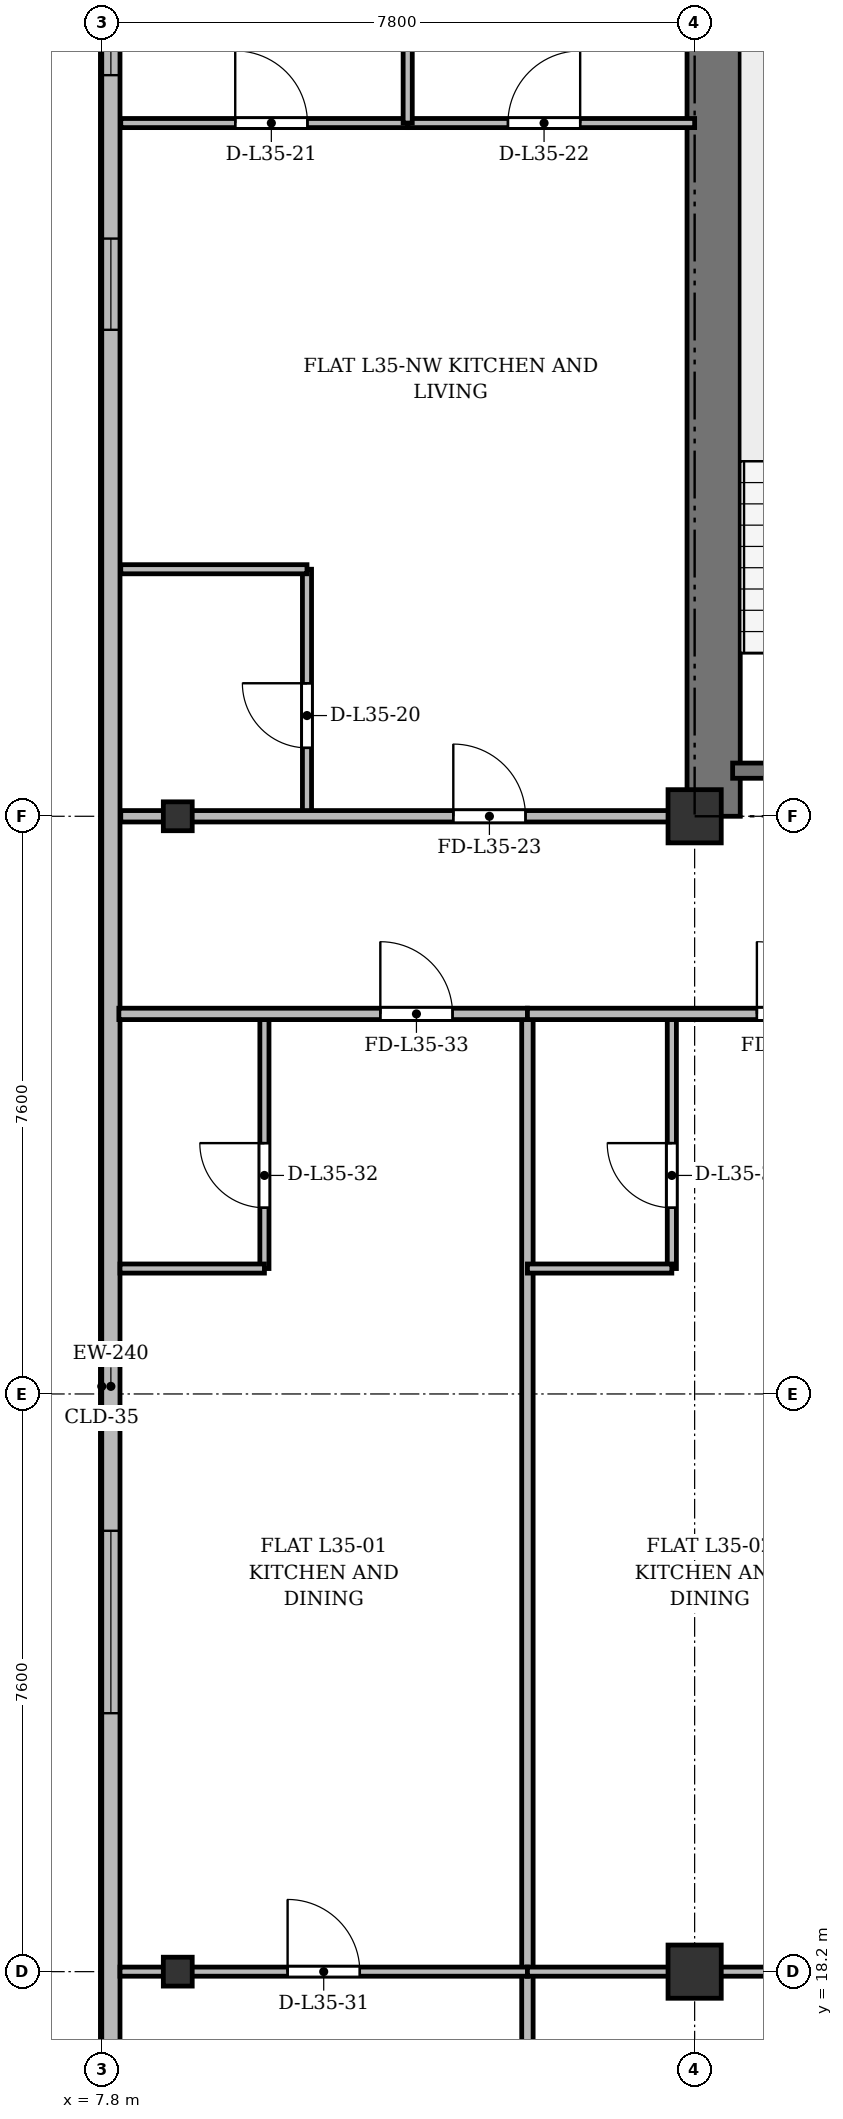
"""IFC4 building model, lengths in metres.
Left out: names, types, materials, properties, quantities, classifications, styles, units other than length and angle.
Written with IfcOpenShell. Run it as: python <this file> out.ifc"""

import sys

from ifc_helpers import new_model, si_unit, direction, frame, frame_2d, origin, origin_2d, place, context, subcontext, project, spatial, rectangle, i_section, extrude, source, transform, mapped, element, fill, save


model = new_model("IFC4")
c1 = context("Model", 3, precision=1e-05, world=origin(), true_north=direction((0.0, 1.0)))
c2 = subcontext(c1, "Body", "Model", "MODEL_VIEW")
j1 = project(units=[si_unit("LENGTHUNIT", "METRE"), si_unit("PLANEANGLEUNIT", "RADIAN")], contexts=[c1])
p1 = place(None, origin())
s1 = spatial("IfcSite", under=j1, at=p1, CompositionType="ELEMENT")
p2 = place(p1, origin())
s2 = spatial("IfcBuilding", under=s1, at=p2, CompositionType="ELEMENT")
p3 = place(p2, frame((0.0, 0.0, 135.7)))
s3 = spatial("IfcBuildingStorey", under=s2, at=p3, CompositionType="ELEMENT", Elevation=135.7)
m1 = source(origin(), c2, "Body", "SweptSolid", [
    extrude(i_section(OverallWidth=0.38, OverallDepth=0.38, WebThickness=0.02, FlangeThickness=0.03, at=origin_2d()), origin(), (0.0, 0.0, 1.0), 3.6),
])
for number, where, z_axis, x_axis in (
    (1, (8.8, 18.2, 0.0), (0.0, 0.0, 1.0), (1.0, 0.0, 0.0)),
    (2, (8.8, 33.4, 0.0), (0.0, 0.0, 1.0), (1.0, 0.0, 0.0)),
):
    element("IfcColumn", number, at=place(p3, frame(where, z_axis=z_axis, x_axis=x_axis)), inside=s3, PredefinedType="COLUMN", context=c2, shape_type="MappedRepresentation", body=[
        mapped(m1, transform((0.0, 0.0, 0.0), x_axis=(1.0, 0.0, 0.0), y_axis=(0.0, 1.0, 0.0), z_axis=(0.0, 0.0, 1.0), scale=1.0)),
    ])
m2 = source(origin(), c2, "Body", "SweptSolid", [
    extrude(rectangle(XDim=0.7, YDim=0.7, at=origin_2d()), origin(), (0.0, 0.0, 1.0), 3.6),
])
for number, where, z_axis, x_axis in (
    (3, (15.6, 18.2, 0.0), (0.0, 0.0, 1.0), (1.0, 0.0, 0.0)),
    (4, (15.6, 33.4, 0.0), (0.0, 0.0, 1.0), (1.0, 0.0, 0.0)),
):
    element("IfcColumn", number, at=place(p3, frame(where, z_axis=z_axis, x_axis=x_axis)), inside=s3, PredefinedType="COLUMN", context=c2, shape_type="MappedRepresentation", body=[
        mapped(m2, transform((0.0, 0.0, 0.0), x_axis=(1.0, 0.0, 0.0), y_axis=(0.0, 1.0, 0.0), z_axis=(0.0, 0.0, 1.0), scale=1.0)),
    ])
p4 = place(p3, frame((7.92, 6.3, 0.0), z_axis=(0.0, 0.0, 1.0), x_axis=(0.0, 1.0, 0.0)))
e5 = element("IfcWall", 5, at=p4, inside=s3, PredefinedType="SOLIDWALL", context=c2, shape_type="SweptSolid", body=[
    extrude(rectangle(XDim=39.2, YDim=0.24, at=frame_2d((19.6, 0.0))), origin(), (0.0, 0.0, 1.0), 3.35),
])
p5 = place(p4, frame((1.45, 0.0, 0.92)))
e6 = element("IfcOpeningElement", 6, at=p5, cuts=e5, PredefinedType="OPENING", context=c2, shape_type="SweptSolid", body=[
    extrude(rectangle(XDim=1.2, YDim=1.65, at=frame_2d((0.6, 0.825))), frame((0.0, 0.13, 0.0), z_axis=(0.0, -1.0, 0.0), x_axis=(1.0, 0.0, 0.0)), (0.0, 0.0, 1.0), 0.26),
])
p6 = place(p4, frame((3.9, 0.0, 0.92)))
e7 = element("IfcOpeningElement", 7, at=p6, cuts=e5, PredefinedType="OPENING", context=c2, shape_type="SweptSolid", body=[
    extrude(rectangle(XDim=2.4, YDim=2.1, at=frame_2d((1.2, 1.05))), frame((0.0, 0.13, 0.0), z_axis=(0.0, -1.0, 0.0), x_axis=(1.0, 0.0, 0.0)), (0.0, 0.0, 1.0), 0.26),
])
p7 = place(p4, frame((8.1, 0.0, 0.92)))
e8 = element("IfcOpeningElement", 8, at=p7, cuts=e5, PredefinedType="OPENING", context=c2, shape_type="SweptSolid", body=[
    extrude(rectangle(XDim=2.4, YDim=2.1, at=frame_2d((1.2, 1.05))), frame((0.0, 0.13, 0.0), z_axis=(0.0, -1.0, 0.0), x_axis=(1.0, 0.0, 0.0)), (0.0, 0.0, 1.0), 0.26),
])
p8 = place(p4, frame((15.3, 0.0, 0.92)))
e9 = element("IfcOpeningElement", 9, at=p8, cuts=e5, PredefinedType="OPENING", context=c2, shape_type="SweptSolid", body=[
    extrude(rectangle(XDim=2.4, YDim=2.1, at=frame_2d((1.2, 1.05))), frame((0.0, 0.13, 0.0), z_axis=(0.0, -1.0, 0.0), x_axis=(1.0, 0.0, 0.0)), (0.0, 0.0, 1.0), 0.26),
])
p9 = place(p4, frame((33.5, 0.0, 0.92)))
e10 = element("IfcOpeningElement", 10, at=p9, cuts=e5, PredefinedType="OPENING", context=c2, shape_type="SweptSolid", body=[
    extrude(rectangle(XDim=1.2, YDim=1.65, at=frame_2d((0.6, 0.825))), frame((0.0, 0.13, 0.0), z_axis=(0.0, -1.0, 0.0), x_axis=(1.0, 0.0, 0.0)), (0.0, 0.0, 1.0), 0.26),
])
p10 = place(p4, frame((36.85, 0.0, 0.92)))
e11 = element("IfcOpeningElement", 11, at=p10, cuts=e5, PredefinedType="OPENING", context=c2, shape_type="SweptSolid", body=[
    extrude(rectangle(XDim=1.2, YDim=1.65, at=frame_2d((0.6, 0.825))), frame((0.0, 0.13, 0.0), z_axis=(0.0, -1.0, 0.0), x_axis=(1.0, 0.0, 0.0)), (0.0, 0.0, 1.0), 0.26),
])
p11 = place(p3, frame((15.85, 33.4, 0.0), z_axis=(0.0, 0.0, 1.0), x_axis=(0.0, 1.0, 0.0)))
e12 = element("IfcWall", 12, at=p11, inside=s3, PredefinedType="SHEAR", context=c2, shape_type="SweptSolid", body=[
    extrude(rectangle(XDim=11.7, YDim=0.7, at=frame_2d((5.85, 0.0))), origin(), (0.0, 0.0, 1.0), 3.35),
])
p12 = place(p3, frame((16.1, 34.0, 0.0), z_axis=(0.0, 0.0, 1.0), x_axis=(1.0, 0.0, 0.0)))
e13 = element("IfcWall", 13, at=p12, inside=s3, PredefinedType="SHEAR", context=c2, shape_type="SweptSolid", body=[
    extrude(rectangle(XDim=3.4, YDim=0.2, at=frame_2d((1.7, 0.0))), origin(), (0.0, 0.0, 1.0), 3.35),
])
p13 = place(p3, frame((10.5, 33.4, 0.0), z_axis=(0.0, 0.0, 1.0), x_axis=(0.0, 1.0, 0.0)))
e14 = element("IfcWall", 14, at=p13, inside=s3, PredefinedType="PARTITIONING", context=c2, shape_type="SweptSolid", body=[
    extrude(rectangle(XDim=3.25, YDim=0.12, at=frame_2d((1.625, 0.0))), origin(), (0.0, 0.0, 1.0), 2.75),
])
p14 = place(p13, frame((0.9, 0.0, 0.0)))
e15 = element("IfcOpeningElement", 15, at=p14, cuts=e14, PredefinedType="OPENING", context=c2, shape_type="SweptSolid", body=[
    extrude(rectangle(XDim=0.85, YDim=2.1, at=frame_2d((0.425, 1.05))), frame((0.0, 0.07, 0.0), z_axis=(0.0, -1.0, 0.0), x_axis=(1.0, 0.0, 0.0)), (0.0, 0.0, 1.0), 0.14),
])
p15 = place(p3, frame((8.05, 36.65, 0.0), z_axis=(0.0, 0.0, 1.0), x_axis=(1.0, 0.0, 0.0)))
e16 = element("IfcWall", 16, at=p15, inside=s3, PredefinedType="PARTITIONING", context=c2, shape_type="SweptSolid", body=[
    extrude(rectangle(XDim=2.45, YDim=0.12, at=frame_2d((1.225, 0.0))), origin(), (0.0, 0.0, 1.0), 2.85),
])
p16 = place(p3, frame((8.05, 42.52, 0.0), z_axis=(0.0, 0.0, 1.0), x_axis=(1.0, 0.0, 0.0)))
e17 = element("IfcWall", 17, at=p16, inside=s3, PredefinedType="PARTITIONING", context=c2, shape_type="SweptSolid", body=[
    extrude(rectangle(XDim=3.775, YDim=0.12, at=frame_2d((1.887, 0.0))), origin(), (0.0, 0.0, 1.0), 2.85),
])
p17 = place(p16, frame((1.506, 0.0, 0.0)))
e18 = element("IfcOpeningElement", 18, at=p17, cuts=e17, PredefinedType="OPENING", context=c2, shape_type="SweptSolid", body=[
    extrude(rectangle(XDim=0.95, YDim=2.15, at=frame_2d((0.475, 1.075))), frame((0.0, 0.07, 0.0), z_axis=(0.0, -1.0, 0.0), x_axis=(1.0, 0.0, 0.0)), (0.0, 0.0, 1.0), 0.14),
])
p18 = place(p3, frame((11.825, 42.52, 0.0), z_axis=(0.0, 0.0, 1.0), x_axis=(1.0, 0.0, 0.0)))
e19 = element("IfcWall", 19, at=p18, inside=s3, PredefinedType="PARTITIONING", context=c2, shape_type="SweptSolid", body=[
    extrude(rectangle(XDim=3.775, YDim=0.12, at=frame_2d((1.888, 0.0))), origin(), (0.0, 0.0, 1.0), 2.85),
])
p19 = place(p18, frame((1.319, 0.0, 0.0)))
e20 = element("IfcOpeningElement", 20, at=p19, cuts=e19, PredefinedType="OPENING", context=c2, shape_type="SweptSolid", body=[
    extrude(rectangle(XDim=0.95, YDim=2.15, at=frame_2d((0.475, 1.075))), frame((0.0, 0.07, 0.0), z_axis=(0.0, -1.0, 0.0), x_axis=(1.0, 0.0, 0.0)), (0.0, 0.0, 1.0), 0.14),
])
p20 = place(p3, frame((11.825, 42.52, 0.0), z_axis=(0.0, 0.0, 1.0), x_axis=(0.0, 1.0, 0.0)))
e21 = element("IfcWall", 21, at=p20, inside=s3, PredefinedType="PARTITIONING", context=c2, shape_type="SweptSolid", body=[
    extrude(rectangle(XDim=5.74, YDim=0.12, at=frame_2d((2.87, 0.0))), origin(), (0.0, 0.0, 1.0), 2.75),
])
p21 = place(p3, frame((8.05, 33.4, 0.0), z_axis=(0.0, 0.0, 1.0), x_axis=(1.0, 0.0, 0.0)))
e22 = element("IfcWall", 22, at=p21, inside=s3, PredefinedType="PARTITIONING", context=c2, shape_type="SweptSolid", body=[
    extrude(rectangle(XDim=7.55, YDim=0.15, at=frame_2d((3.775, 0.0))), origin(), (0.0, 0.0, 1.0), 2.75),
])
p22 = place(p21, frame((4.375, 0.0, 0.0)))
e23 = element("IfcOpeningElement", 23, at=p22, cuts=e22, PredefinedType="OPENING", context=c2, shape_type="SweptSolid", body=[
    extrude(rectangle(XDim=0.95, YDim=2.15, at=frame_2d((0.475, 1.075))), frame((0.0, 0.085, 0.0), z_axis=(0.0, -1.0, 0.0), x_axis=(1.0, 0.0, 0.0)), (0.0, 0.0, 1.0), 0.17),
])
p23 = place(p3, frame((13.4, 3.525, 0.0), z_axis=(0.0, 0.0, 1.0), x_axis=(0.0, 1.0, 0.0)))
e24 = element("IfcWall", 24, at=p23, inside=s3, PredefinedType="PARTITIONING", context=c2, shape_type="SweptSolid", body=[
    extrude(rectangle(XDim=27.275, YDim=0.15, at=frame_2d((13.638, 0.0))), origin(), (0.0, 0.0, 1.0), 2.75),
])
p24 = place(p3, frame((8.04, 18.2, 0.0), z_axis=(0.0, 0.0, 1.0), x_axis=(1.0, 0.0, 0.0)))
e25 = element("IfcWall", 25, at=p24, inside=s3, PredefinedType="PARTITIONING", context=c2, shape_type="SweptSolid", body=[
    extrude(rectangle(XDim=5.36, YDim=0.12, at=frame_2d((2.68, 0.0))), origin(), (0.0, 0.0, 1.0), 2.75),
])
p25 = place(p24, frame((2.205, 0.0, 0.0)))
e26 = element("IfcOpeningElement", 26, at=p25, cuts=e25, PredefinedType="OPENING", context=c2, shape_type="SweptSolid", body=[
    extrude(rectangle(XDim=0.95, YDim=2.15, at=frame_2d((0.475, 1.075))), frame((0.0, 0.07, 0.0), z_axis=(0.0, -1.0, 0.0), x_axis=(1.0, 0.0, 0.0)), (0.0, 0.0, 1.0), 0.14),
])
p26 = place(p3, frame((9.94, 27.45, 0.0), z_axis=(0.0, 0.0, 1.0), x_axis=(0.0, 1.0, 0.0)))
e27 = element("IfcWall", 27, at=p26, inside=s3, PredefinedType="PARTITIONING", context=c2, shape_type="SweptSolid", body=[
    extrude(rectangle(XDim=3.35, YDim=0.12, at=frame_2d((1.675, 0.0))), origin(), (0.0, 0.0, 1.0), 3.35),
])
p27 = place(p26, frame((0.8, 0.0, 0.0)))
e28 = element("IfcOpeningElement", 28, at=p27, cuts=e27, PredefinedType="OPENING", context=c2, shape_type="SweptSolid", body=[
    extrude(rectangle(XDim=0.85, YDim=2.1, at=frame_2d((0.425, 1.05))), frame((0.0, 0.07, 0.0), z_axis=(0.0, -1.0, 0.0), x_axis=(1.0, 0.0, 0.0)), (0.0, 0.0, 1.0), 0.14),
])
p28 = place(p3, frame((8.04, 27.45, 0.0), z_axis=(0.0, 0.0, 1.0), x_axis=(1.0, 0.0, 0.0)))
e29 = element("IfcWall", 29, at=p28, inside=s3, PredefinedType="PARTITIONING", context=c2, shape_type="SweptSolid", body=[
    extrude(rectangle(XDim=1.9, YDim=0.12, at=frame_2d((0.95, 0.0))), origin(), (0.0, 0.0, 1.0), 2.85),
])
p29 = place(p3, frame((8.025, 30.8, 0.0), z_axis=(0.0, 0.0, 1.0), x_axis=(1.0, 0.0, 0.0)))
e30 = element("IfcWall", 30, at=p29, inside=s3, PredefinedType="PARTITIONING", context=c2, shape_type="SweptSolid", body=[
    extrude(rectangle(XDim=5.375, YDim=0.15, at=frame_2d((2.688, 0.0))), origin(), (0.0, 0.0, 1.0), 2.85),
])
p30 = place(p29, frame((3.44, 0.0, 0.0)))
e31 = element("IfcOpeningElement", 31, at=p30, cuts=e30, PredefinedType="OPENING", context=c2, shape_type="SweptSolid", body=[
    extrude(rectangle(XDim=0.95, YDim=2.15, at=frame_2d((0.475, 1.075))), frame((0.0, 0.085, 0.0), z_axis=(0.0, -1.0, 0.0), x_axis=(1.0, 0.0, 0.0)), (0.0, 0.0, 1.0), 0.17),
])
p31 = place(p3, frame((13.4, 18.2, 0.0), z_axis=(0.0, 0.0, 1.0), x_axis=(1.0, 0.0, 0.0)))
e32 = element("IfcWall", 32, at=p31, inside=s3, PredefinedType="PARTITIONING", context=c2, shape_type="SweptSolid", body=[
    extrude(rectangle(XDim=4.8, YDim=0.12, at=frame_2d((2.4, 0.0))), origin(), (0.0, 0.0, 1.0), 2.75),
])
p32 = place(p31, frame((3.288, 0.0, 0.0)))
e33 = element("IfcOpeningElement", 33, at=p32, cuts=e32, PredefinedType="OPENING", context=c2, shape_type="SweptSolid", body=[
    extrude(rectangle(XDim=0.95, YDim=2.15, at=frame_2d((0.475, 1.075))), frame((0.0, 0.07, 0.0), z_axis=(0.0, -1.0, 0.0), x_axis=(1.0, 0.0, 0.0)), (0.0, 0.0, 1.0), 0.14),
])
p33 = place(p3, frame((15.3, 27.45, 0.0), z_axis=(0.0, 0.0, 1.0), x_axis=(0.0, 1.0, 0.0)))
e34 = element("IfcWall", 34, at=p33, inside=s3, PredefinedType="PARTITIONING", context=c2, shape_type="SweptSolid", body=[
    extrude(rectangle(XDim=3.35, YDim=0.12, at=frame_2d((1.675, 0.0))), origin(), (0.0, 0.0, 1.0), 3.35),
])
p34 = place(p33, frame((0.8, 0.0, 0.0)))
e35 = element("IfcOpeningElement", 35, at=p34, cuts=e34, PredefinedType="OPENING", context=c2, shape_type="SweptSolid", body=[
    extrude(rectangle(XDim=0.85, YDim=2.1, at=frame_2d((0.425, 1.05))), frame((0.0, 0.07, 0.0), z_axis=(0.0, -1.0, 0.0), x_axis=(1.0, 0.0, 0.0)), (0.0, 0.0, 1.0), 0.14),
])
p35 = place(p3, frame((13.4, 27.45, 0.0), z_axis=(0.0, 0.0, 1.0), x_axis=(1.0, 0.0, 0.0)))
e36 = element("IfcWall", 36, at=p35, inside=s3, PredefinedType="PARTITIONING", context=c2, shape_type="SweptSolid", body=[
    extrude(rectangle(XDim=1.9, YDim=0.12, at=frame_2d((0.95, 0.0))), origin(), (0.0, 0.0, 1.0), 3.35),
])
p36 = place(p3, frame((13.4, 30.8, 0.0), z_axis=(0.0, 0.0, 1.0), x_axis=(1.0, 0.0, 0.0)))
e37 = element("IfcWall", 37, at=p36, inside=s3, PredefinedType="PARTITIONING", context=c2, shape_type="SweptSolid", body=[
    extrude(rectangle(XDim=4.8, YDim=0.15, at=frame_2d((2.4, 0.0))), origin(), (0.0, 0.0, 1.0), 2.85),
])
p37 = place(p36, frame((3.019, 0.0, 0.0)))
e38 = element("IfcOpeningElement", 38, at=p37, cuts=e37, PredefinedType="OPENING", context=c2, shape_type="SweptSolid", body=[
    extrude(rectangle(XDim=0.95, YDim=2.15, at=frame_2d((0.475, 1.075))), frame((0.0, 0.085, 0.0), z_axis=(0.0, -1.0, 0.0), x_axis=(1.0, 0.0, 0.0)), (0.0, 0.0, 1.0), 0.17),
])
m3 = source(origin(), c2, "Body", "SweptSolid", [
    extrude(rectangle(XDim=2.4, YDim=2.1, at=frame_2d((1.2, 1.05))), frame((0.0, 0.03, 0.0), z_axis=(0.0, -1.0, 0.0), x_axis=(1.0, 0.0, 0.0)), (0.0, 0.0, 1.0), 0.06),
])
p38 = place(p8, origin())
e39 = element("IfcWindow", 39, at=p38, inside=s3, PartitioningType="SINGLE_PANEL", PredefinedType="WINDOW", context=c2, shape_type="MappedRepresentation", body=[
    mapped(m3, transform((0.0, 0.0, 0.0), x_axis=(1.0, 0.0, 0.0), y_axis=(0.0, 1.0, 0.0), z_axis=(0.0, 0.0, 1.0), scale=1.0)),
])
fill(e9, e39)
m4 = source(origin(), c2, "Body", "SweptSolid", [
    extrude(rectangle(XDim=1.2, YDim=1.65, at=frame_2d((0.6, 0.825))), frame((0.0, 0.03, 0.0), z_axis=(0.0, -1.0, 0.0), x_axis=(1.0, 0.0, 0.0)), (0.0, 0.0, 1.0), 0.06),
])
p39 = place(p9, origin())
e40 = element("IfcWindow", 40, at=p39, inside=s3, PartitioningType="SINGLE_PANEL", PredefinedType="WINDOW", context=c2, shape_type="MappedRepresentation", body=[
    mapped(m4, transform((0.0, 0.0, 0.0), x_axis=(1.0, 0.0, 0.0), y_axis=(0.0, 1.0, 0.0), z_axis=(0.0, 0.0, 1.0), scale=1.0)),
])
fill(e10, e40)
p40 = place(p10, origin())
e41 = element("IfcWindow", 41, at=p40, inside=s3, PartitioningType="SINGLE_PANEL", PredefinedType="WINDOW", context=c2, shape_type="MappedRepresentation", body=[
    mapped(m4, transform((0.0, 0.0, 0.0), x_axis=(1.0, 0.0, 0.0), y_axis=(0.0, 1.0, 0.0), z_axis=(0.0, 0.0, 1.0), scale=1.0)),
])
fill(e11, e41)
m5 = source(origin(), c2, "Body", "SweptSolid", [
    extrude(rectangle(XDim=0.85, YDim=2.1, at=frame_2d((0.425, 1.05))), frame((0.0, 0.025, 0.0), z_axis=(0.0, -1.0, 0.0), x_axis=(1.0, 0.0, 0.0)), (0.0, 0.0, 1.0), 0.05),
])
p41 = place(p14, origin())
e42 = element("IfcDoor", 42, at=p41, inside=s3, OperationType="SINGLE_SWING_RIGHT", PredefinedType="DOOR", context=c2, shape_type="MappedRepresentation", body=[
    mapped(m5, transform((0.0, 0.0, 0.0), x_axis=(1.0, 0.0, 0.0), y_axis=(0.0, 1.0, 0.0), z_axis=(0.0, 0.0, 1.0), scale=1.0)),
])
fill(e15, e42)
m6 = source(origin(), c2, "Body", "SweptSolid", [
    extrude(rectangle(XDim=0.95, YDim=2.15, at=frame_2d((0.475, 1.075))), frame((0.0, 0.025, 0.0), z_axis=(0.0, -1.0, 0.0), x_axis=(1.0, 0.0, 0.0)), (0.0, 0.0, 1.0), 0.05),
])
p42 = place(p17, origin())
e43 = element("IfcDoor", 43, at=p42, inside=s3, OperationType="SINGLE_SWING_LEFT", PredefinedType="DOOR", context=c2, shape_type="MappedRepresentation", body=[
    mapped(m6, transform((0.0, 0.0, 0.0), x_axis=(1.0, 0.0, 0.0), y_axis=(0.0, 1.0, 0.0), z_axis=(0.0, 0.0, 1.0), scale=1.0)),
])
fill(e18, e43)
p43 = place(p19, origin())
e44 = element("IfcDoor", 44, at=p43, inside=s3, OperationType="SINGLE_SWING_RIGHT", PredefinedType="DOOR", context=c2, shape_type="MappedRepresentation", body=[
    mapped(m6, transform((0.0, 0.0, 0.0), x_axis=(1.0, 0.0, 0.0), y_axis=(0.0, 1.0, 0.0), z_axis=(0.0, 0.0, 1.0), scale=1.0)),
])
fill(e20, e44)
p44 = place(p22, origin())
e45 = element("IfcDoor", 45, at=p44, inside=s3, OperationType="SINGLE_SWING_LEFT", PredefinedType="DOOR", context=c2, shape_type="MappedRepresentation", body=[
    mapped(m6, transform((0.0, 0.0, 0.0), x_axis=(1.0, 0.0, 0.0), y_axis=(0.0, 1.0, 0.0), z_axis=(0.0, 0.0, 1.0), scale=1.0)),
])
fill(e23, e45)
p45 = place(p25, origin())
e46 = element("IfcDoor", 46, at=p45, inside=s3, OperationType="SINGLE_SWING_LEFT", PredefinedType="DOOR", context=c2, shape_type="MappedRepresentation", body=[
    mapped(m6, transform((0.0, 0.0, 0.0), x_axis=(1.0, 0.0, 0.0), y_axis=(0.0, 1.0, 0.0), z_axis=(0.0, 0.0, 1.0), scale=1.0)),
])
fill(e26, e46)
p46 = place(p27, origin())
e47 = element("IfcDoor", 47, at=p46, inside=s3, OperationType="SINGLE_SWING_RIGHT", PredefinedType="DOOR", context=c2, shape_type="MappedRepresentation", body=[
    mapped(m5, transform((0.0, 0.0, 0.0), x_axis=(1.0, 0.0, 0.0), y_axis=(0.0, 1.0, 0.0), z_axis=(0.0, 0.0, 1.0), scale=1.0)),
])
fill(e28, e47)
p47 = place(p30, origin())
e48 = element("IfcDoor", 48, at=p47, inside=s3, OperationType="SINGLE_SWING_LEFT", PredefinedType="DOOR", context=c2, shape_type="MappedRepresentation", body=[
    mapped(m6, transform((0.0, 0.0, 0.0), x_axis=(1.0, 0.0, 0.0), y_axis=(0.0, 1.0, 0.0), z_axis=(0.0, 0.0, 1.0), scale=1.0)),
])
fill(e31, e48)
p48 = place(p34, origin())
e49 = element("IfcDoor", 49, at=p48, inside=s3, OperationType="SINGLE_SWING_RIGHT", PredefinedType="DOOR", context=c2, shape_type="MappedRepresentation", body=[
    mapped(m5, transform((0.0, 0.0, 0.0), x_axis=(1.0, 0.0, 0.0), y_axis=(0.0, 1.0, 0.0), z_axis=(0.0, 0.0, 1.0), scale=1.0)),
])
fill(e35, e49)
p49 = place(p37, origin())
e50 = element("IfcDoor", 50, at=p49, inside=s3, OperationType="SINGLE_SWING_LEFT", PredefinedType="DOOR", context=c2, shape_type="MappedRepresentation", body=[
    mapped(m6, transform((0.0, 0.0, 0.0), x_axis=(1.0, 0.0, 0.0), y_axis=(0.0, 1.0, 0.0), z_axis=(0.0, 0.0, 1.0), scale=1.0)),
])
fill(e38, e50)
save(model, sys.argv[1])
